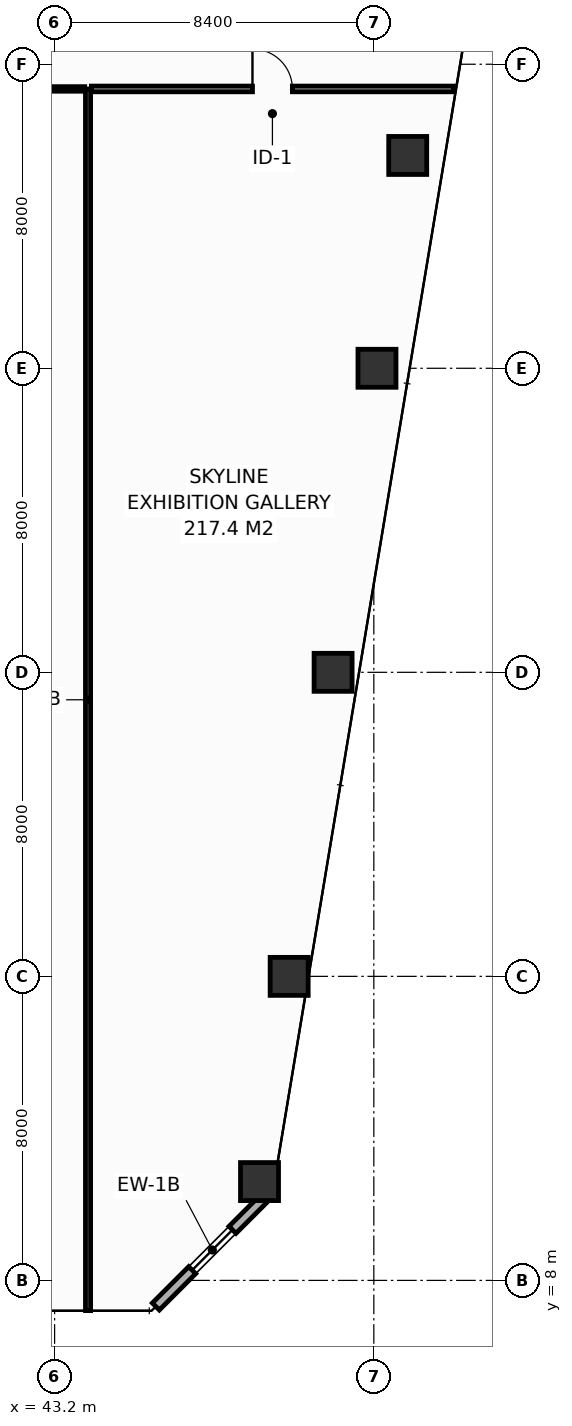
"""IFC4 building model, lengths in metres.
Left out: names, types, materials, properties, quantities, classifications, styles, units other than length and angle.
Written with IfcOpenShell. Run it as: python <this file> out.ifc"""

import sys

from ifc_helpers import new_model, si_unit, direction, frame, frame_2d, origin, origin_2d, place, context, subcontext, project, spatial, rectangle, hollow_rectangle, extrude, element, fill, save


model = new_model("IFC4")
c1 = context("Model", 3, precision=1e-05, world=origin(), true_north=direction((0.0, 1.0)))
c2 = subcontext(c1, "Body", "Model", "MODEL_VIEW")
j1 = project(units=[si_unit("LENGTHUNIT", "METRE"), si_unit("PLANEANGLEUNIT", "RADIAN")], contexts=[c1])
p1 = place(None, origin())
s1 = spatial("IfcSite", under=j1, at=p1, CompositionType="ELEMENT")
p2 = place(p1, origin())
s2 = spatial("IfcBuilding", under=s1, at=p2, CompositionType="ELEMENT")
p3 = place(p2, frame((0.0, 0.0, 106.0)))
s3 = spatial("IfcBuildingStorey", under=s2, at=p3, CompositionType="ELEMENT", Elevation=106.0)
for number, where, z_axis, x_axis in (
    (1, (48.592, 10.6, 0.0), (0.0, 0.0, 1.0), (1.0, 0.0, 0.0)),
    (2, (49.372, 16.0, 0.0), (0.0, 0.0, 1.0), (1.0, 0.0, 0.0)),
    (3, (50.528, 24.0, 0.0), (0.0, 0.0, 1.0), (1.0, 0.0, 0.0)),
    (4, (51.683, 32.0, 0.0), (0.0, 0.0, 1.0), (1.0, 0.0, 0.0)),
    (5, (52.492, 37.6, 0.0), (0.0, 0.0, 1.0), (1.0, 0.0, 0.0)),
):
    element("IfcColumn", number, at=place(p3, frame(where, z_axis=z_axis, x_axis=x_axis)), inside=s3, PredefinedType="COLUMN", context=c2, shape_type="SweptSolid", body=[
        extrude(hollow_rectangle(XDim=1.0, YDim=1.0, WallThickness=0.045, at=origin_2d()), origin(), (0.0, 0.0, 1.0), 4.4),
    ])
p4 = place(p3, frame((45.864, 7.313, 0.0), z_axis=(0.0, 0.0, 1.0), x_axis=(0.70707775441, 0.707135806771, 0.0)))
e6 = element("IfcWall", 6, at=p4, inside=s3, PredefinedType="STANDARD", context=c2, shape_type="SweptSolid", body=[
    extrude(rectangle(XDim=4.206, YDim=0.26, at=frame_2d((2.103, 0.0))), origin(), (0.0, 0.0, 1.0), 4.15),
])
p5 = place(p4, frame((1.353, 0.0, 0.9)))
e7 = element("IfcOpeningElement", 7, at=p5, cuts=e6, PredefinedType="OPENING", context=c2, shape_type="SweptSolid", body=[
    extrude(rectangle(XDim=1.5, YDim=1.85, at=frame_2d((0.75, 0.925))), frame((0.0, 0.14, 0.0), z_axis=(0.0, -1.0, 0.0), x_axis=(1.0, 0.0, 0.0)), (0.0, 0.0, 1.0), 0.28),
])
p6 = place(p3, frame((44.08, 7.205, 0.0), z_axis=(0.0, 0.0, 1.0), x_axis=(0.0, 1.0, 0.0)))
e8 = element("IfcWall", 8, at=p6, inside=s3, PredefinedType="PARTITIONING", context=c2, shape_type="SweptSolid", body=[
    extrude(rectangle(XDim=32.145, YDim=0.135, at=frame_2d((16.073, 0.0))), origin(), (0.0, 0.0, 1.0), 3.335),
])
p7 = place(p3, frame((36.23, 39.35, 0.0), z_axis=(0.0, 0.0, 1.0), x_axis=(1.0, 0.0, 0.0)))
e9 = element("IfcWall", 9, at=p7, inside=s3, PredefinedType="PARTITIONING", context=c2, shape_type="SweptSolid", body=[
    extrude(rectangle(XDim=7.762, YDim=0.12, at=frame_2d((3.881, 0.0))), origin(), (0.0, 0.0, 1.0), 3.335),
])
p8 = place(p7, frame((3.381, 0.0, 0.0)))
e10 = element("IfcOpeningElement", 10, at=p8, cuts=e9, PredefinedType="OPENING", context=c2, shape_type="SweptSolid", body=[
    extrude(rectangle(XDim=1.0, YDim=2.15, at=frame_2d((0.5, 1.075))), frame((0.0, 0.07, 0.0), z_axis=(0.0, -1.0, 0.0), x_axis=(1.0, 0.0, 0.0)), (0.0, 0.0, 1.0), 0.14),
])
p9 = place(p3, frame((44.167, 39.35, 0.0), z_axis=(0.0, 0.0, 1.0), x_axis=(1.0, 0.0, 0.0)))
e11 = element("IfcWall", 11, at=p9, inside=s3, PredefinedType="PARTITIONING", context=c2, shape_type="SweptSolid", body=[
    extrude(rectangle(XDim=9.528, YDim=0.15, at=frame_2d((4.764, 0.0))), origin(), (0.0, 0.0, 1.0), 3.635),
])
p10 = place(p9, frame((4.239, 0.0, 0.0)))
e12 = element("IfcOpeningElement", 12, at=p10, cuts=e11, PredefinedType="OPENING", context=c2, shape_type="SweptSolid", body=[
    extrude(rectangle(XDim=1.05, YDim=2.15, at=frame_2d((0.525, 1.075))), frame((0.0, 0.085, 0.0), z_axis=(0.0, -1.0, 0.0), x_axis=(1.0, 0.0, 0.0)), (0.0, 0.0, 1.0), 0.17),
])
p11 = place(p5, origin())
e13 = element("IfcWindow", 13, at=p11, inside=s3, PartitioningType="SINGLE_PANEL", PredefinedType="WINDOW", context=c2, shape_type="SweptSolid", body=[
    extrude(rectangle(XDim=1.5, YDim=1.85, at=frame_2d((0.75, 0.925))), frame((0.0, 0.03, 0.0), z_axis=(0.0, -1.0, 0.0), x_axis=(1.0, 0.0, 0.0)), (0.0, 0.0, 1.0), 0.06),
])
fill(e7, e13)
p12 = place(p10, origin())
e14 = element("IfcDoor", 14, at=p12, inside=s3, OperationType="SINGLE_SWING_LEFT", PredefinedType="DOOR", context=c2, shape_type="SweptSolid", body=[
    extrude(rectangle(XDim=1.05, YDim=2.15, at=frame_2d((0.525, 1.075))), frame((0.0, 0.025, 0.0), z_axis=(0.0, -1.0, 0.0), x_axis=(1.0, 0.0, 0.0)), (0.0, 0.0, 1.0), 0.05),
])
fill(e12, e14)
save(model, sys.argv[1])
